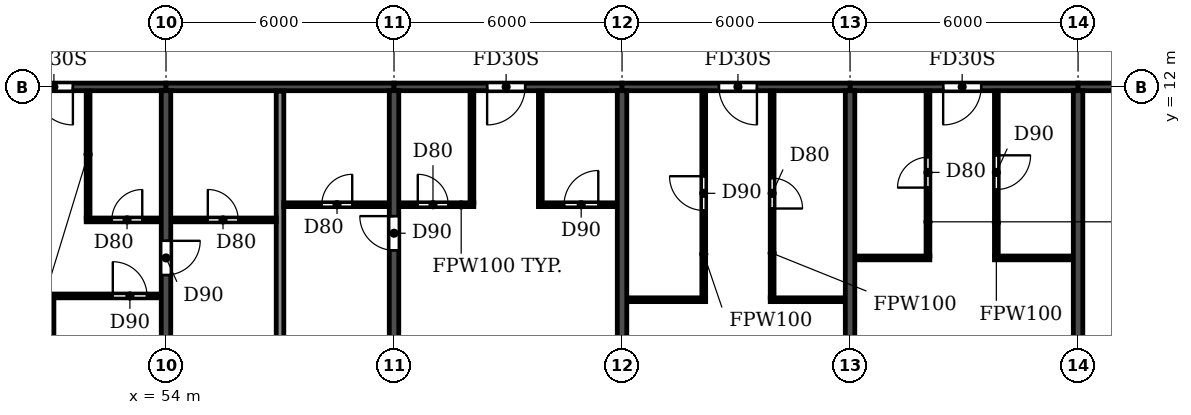
"""IFC4 building model, lengths in metres.
Left out: names, types, materials, properties, quantities, classifications, styles, units other than length and angle.
Written with IfcOpenShell. Run it as: python <this file> out.ifc"""

import sys

from ifc_helpers import new_model, si_unit, direction, frame, frame_2d, origin, place, context, subcontext, project, spatial, rectangle, extrude, element, fill, save


model = new_model("IFC4")
c1 = context("Model", 3, precision=1e-05, world=origin(), true_north=direction((0.0, 1.0)))
c2 = subcontext(c1, "Body", "Model", "MODEL_VIEW")
j1 = project(units=[si_unit("LENGTHUNIT", "METRE"), si_unit("PLANEANGLEUNIT", "RADIAN")], contexts=[c1])
p1 = place(None, origin())
s1 = spatial("IfcSite", under=j1, at=p1, CompositionType="ELEMENT")
p2 = place(p1, origin())
s2 = spatial("IfcBuilding", under=s1, at=p2, CompositionType="ELEMENT")
p3 = place(p2, frame((0.0, 0.0, 175.2)))
s3 = spatial("IfcBuildingStorey", under=s2, at=p3, CompositionType="ELEMENT", Elevation=175.2)
p4 = place(p3, frame((54.0, 0.2, 0.0), z_axis=(0.0, 0.0, 1.0), x_axis=(0.0, 1.0, 0.0)))
e1 = element("IfcWall", 1, at=p4, inside=s3, PredefinedType="SHEAR", context=c2, shape_type="SweptSolid", body=[
    extrude(rectangle(XDim=11.7, YDim=0.25, at=frame_2d((5.85, 0.0))), origin(), (0.0, 0.0, 1.0), 3.08),
])
p5 = place(p4, frame((6.85, 0.0, 0.0)))
e2 = element("IfcOpeningElement", 2, at=p5, cuts=e1, PredefinedType="OPENING", context=c2, shape_type="SweptSolid", body=[
    extrude(rectangle(XDim=0.9, YDim=2.1, at=frame_2d((0.45, 1.05))), frame((0.0, 0.135, 0.0), z_axis=(0.0, -1.0, 0.0), x_axis=(1.0, 0.0, 0.0)), (0.0, 0.0, 1.0), 0.27),
])
p6 = place(p3, frame((60.0, 0.2, 0.0), z_axis=(0.0, 0.0, 1.0), x_axis=(0.0, 1.0, 0.0)))
e3 = element("IfcWall", 3, at=p6, inside=s3, PredefinedType="SHEAR", context=c2, shape_type="SweptSolid", body=[
    extrude(rectangle(XDim=11.7, YDim=0.25, at=frame_2d((5.85, 0.0))), origin(), (0.0, 0.0, 1.0), 3.08),
])
p7 = place(p6, frame((7.5, 0.0, 0.0)))
e4 = element("IfcOpeningElement", 4, at=p7, cuts=e3, PredefinedType="OPENING", context=c2, shape_type="SweptSolid", body=[
    extrude(rectangle(XDim=0.9, YDim=2.1, at=frame_2d((0.45, 1.05))), frame((0.0, 0.135, 0.0), z_axis=(0.0, -1.0, 0.0), x_axis=(1.0, 0.0, 0.0)), (0.0, 0.0, 1.0), 0.27),
])
for number, where, z_axis, x_axis in (
    (5, (66.0, 0.2, 0.0), (0.0, 0.0, 1.0), (0.0, 1.0, 0.0)),
    (6, (72.0, 0.2, 0.0), (0.0, 0.0, 1.0), (0.0, 1.0, 0.0)),
    (7, (78.0, 0.2, 0.0), (0.0, 0.0, 1.0), (0.0, 1.0, 0.0)),
):
    element("IfcWall", number, at=place(p3, frame(where, z_axis=z_axis, x_axis=x_axis)), inside=s3, PredefinedType="SHEAR", context=c2, shape_type="SweptSolid", body=[
        extrude(rectangle(XDim=11.7, YDim=0.25, at=frame_2d((5.85, 0.0))), origin(), (0.0, 0.0, 1.0), 3.08),
    ])
p8 = place(p3, frame((48.0, 12.0, 0.0), z_axis=(0.0, 0.0, 1.0), x_axis=(1.0, 0.0, 0.0)))
e8 = element("IfcWall", 8, at=p8, inside=s3, PredefinedType="SHEAR", context=c2, shape_type="SweptSolid", body=[
    extrude(rectangle(XDim=6.0, YDim=0.2, at=frame_2d((3.0, 0.0))), origin(), (0.0, 0.0, 1.0), 2.48),
])
p9 = place(p8, frame((2.55, 0.0, 0.0)))
e9 = element("IfcOpeningElement", 9, at=p9, cuts=e8, PredefinedType="OPENING", context=c2, shape_type="SweptSolid", body=[
    extrude(rectangle(XDim=1.0, YDim=2.1, at=frame_2d((0.5, 1.05))), frame((0.0, 0.11, 0.0), z_axis=(0.0, -1.0, 0.0), x_axis=(1.0, 0.0, 0.0)), (0.0, 0.0, 1.0), 0.22),
])
p10 = place(p3, frame((54.0, 12.0, 0.0), z_axis=(0.0, 0.0, 1.0), x_axis=(1.0, 0.0, 0.0)))
e10 = element("IfcWall", 10, at=p10, inside=s3, PredefinedType="SHEAR", context=c2, shape_type="SweptSolid", body=[
    extrude(rectangle(XDim=6.0, YDim=0.2, at=frame_2d((3.0, 0.0))), origin(), (0.0, 0.0, 1.0), 2.48),
])
p11 = place(p3, frame((60.0, 12.0, 0.0), z_axis=(0.0, 0.0, 1.0), x_axis=(1.0, 0.0, 0.0)))
e11 = element("IfcWall", 11, at=p11, inside=s3, PredefinedType="SHEAR", context=c2, shape_type="SweptSolid", body=[
    extrude(rectangle(XDim=6.0, YDim=0.2, at=frame_2d((3.0, 0.0))), origin(), (0.0, 0.0, 1.0), 2.48),
])
p12 = place(p11, frame((2.45, 0.0, 0.0)))
e12 = element("IfcOpeningElement", 12, at=p12, cuts=e11, PredefinedType="OPENING", context=c2, shape_type="SweptSolid", body=[
    extrude(rectangle(XDim=1.0, YDim=2.1, at=frame_2d((0.5, 1.05))), frame((0.0, 0.11, 0.0), z_axis=(0.0, -1.0, 0.0), x_axis=(1.0, 0.0, 0.0)), (0.0, 0.0, 1.0), 0.22),
])
p13 = place(p3, frame((66.0, 12.0, 0.0), z_axis=(0.0, 0.0, 1.0), x_axis=(1.0, 0.0, 0.0)))
e13 = element("IfcWall", 13, at=p13, inside=s3, PredefinedType="SHEAR", context=c2, shape_type="SweptSolid", body=[
    extrude(rectangle(XDim=6.0, YDim=0.2, at=frame_2d((3.0, 0.0))), origin(), (0.0, 0.0, 1.0), 2.48),
])
p14 = place(p13, frame((2.55, 0.0, 0.0)))
e14 = element("IfcOpeningElement", 14, at=p14, cuts=e13, PredefinedType="OPENING", context=c2, shape_type="SweptSolid", body=[
    extrude(rectangle(XDim=1.0, YDim=2.1, at=frame_2d((0.5, 1.05))), frame((0.0, 0.11, 0.0), z_axis=(0.0, -1.0, 0.0), x_axis=(1.0, 0.0, 0.0)), (0.0, 0.0, 1.0), 0.22),
])
p15 = place(p3, frame((72.0, 12.0, 0.0), z_axis=(0.0, 0.0, 1.0), x_axis=(1.0, 0.0, 0.0)))
e15 = element("IfcWall", 15, at=p15, inside=s3, PredefinedType="SHEAR", context=c2, shape_type="SweptSolid", body=[
    extrude(rectangle(XDim=6.0, YDim=0.2, at=frame_2d((3.0, 0.0))), origin(), (0.0, 0.0, 1.0), 2.48),
])
p16 = place(p15, frame((2.45, 0.0, 0.0)))
e16 = element("IfcOpeningElement", 16, at=p16, cuts=e15, PredefinedType="OPENING", context=c2, shape_type="SweptSolid", body=[
    extrude(rectangle(XDim=1.0, YDim=2.1, at=frame_2d((0.5, 1.05))), frame((0.0, 0.11, 0.0), z_axis=(0.0, -1.0, 0.0), x_axis=(1.0, 0.0, 0.0)), (0.0, 0.0, 1.0), 0.22),
])
p17 = place(p3, frame((78.0, 12.0, 0.0), z_axis=(0.0, 0.0, 1.0), x_axis=(1.0, 0.0, 0.0)))
e17 = element("IfcWall", 17, at=p17, inside=s3, PredefinedType="SHEAR", context=c2, shape_type="SweptSolid", body=[
    extrude(rectangle(XDim=5.8, YDim=0.2, at=frame_2d((2.9, 0.0))), origin(), (0.0, 0.0, 1.0), 2.48),
])
p18 = place(p17, frame((2.5, 0.0, 0.0)))
e18 = element("IfcOpeningElement", 18, at=p18, cuts=e17, PredefinedType="OPENING", context=c2, shape_type="SweptSolid", body=[
    extrude(rectangle(XDim=1.0, YDim=2.1, at=frame_2d((0.5, 1.05))), frame((0.0, 0.11, 0.0), z_axis=(0.0, -1.0, 0.0), x_axis=(1.0, 0.0, 0.0)), (0.0, 0.0, 1.0), 0.22),
])
p19 = place(p3, frame((57.0, 0.06, 0.0), z_axis=(0.0, 0.0, 1.0), x_axis=(0.0, 1.0, 0.0)))
e19 = element("IfcWall", 19, at=p19, inside=s3, PredefinedType="PARTITIONING", context=c2, shape_type="SweptSolid", body=[
    extrude(rectangle(XDim=11.83, YDim=0.2, at=frame_2d((5.915, 0.0))), origin(), (0.0, 0.0, 1.0), 3.08),
])
p20 = place(p3, frame((66.135, 6.4, 0.0), z_axis=(0.0, 0.0, 1.0), x_axis=(1.0, 0.0, 0.0)))
e20 = element("IfcWall", 20, at=p20, inside=s3, PredefinedType="PARTITIONING", context=c2, shape_type="SweptSolid", body=[
    extrude(rectangle(XDim=2.065, YDim=0.1, at=frame_2d((1.032, 0.0))), origin(), (0.0, 0.0, 1.0), 3.08),
])
p21 = place(p3, frame((69.9, 6.4, 0.0), z_axis=(0.0, 0.0, 1.0), x_axis=(1.0, 0.0, 0.0)))
e21 = element("IfcWall", 21, at=p21, inside=s3, PredefinedType="PARTITIONING", context=c2, shape_type="SweptSolid", body=[
    extrude(rectangle(XDim=1.965, YDim=0.1, at=frame_2d((0.982, 0.0))), origin(), (0.0, 0.0, 1.0), 3.08),
])
p22 = place(p3, frame((50.95, 6.5, 0.0), z_axis=(0.0, 0.0, 1.0), x_axis=(1.0, 0.0, 0.0)))
e22 = element("IfcWall", 22, at=p22, inside=s3, PredefinedType="PARTITIONING", context=c2, shape_type="SweptSolid", body=[
    extrude(rectangle(XDim=2.915, YDim=0.1, at=frame_2d((1.458, 0.0))), origin(), (0.0, 0.0, 1.0), 3.08),
])
p23 = place(p22, frame((1.65, 0.0, 0.0)))
e23 = element("IfcOpeningElement", 23, at=p23, cuts=e22, PredefinedType="OPENING", context=c2, shape_type="SweptSolid", body=[
    extrude(rectangle(XDim=0.9, YDim=2.1, at=frame_2d((0.45, 1.05))), frame((0.0, 0.06, 0.0), z_axis=(0.0, -1.0, 0.0), x_axis=(1.0, 0.0, 0.0)), (0.0, 0.0, 1.0), 0.12),
])
p24 = place(p3, frame((72.135, 7.5, 0.0), z_axis=(0.0, 0.0, 1.0), x_axis=(1.0, 0.0, 0.0)))
e24 = element("IfcWall", 24, at=p24, inside=s3, PredefinedType="PARTITIONING", context=c2, shape_type="SweptSolid", body=[
    extrude(rectangle(XDim=1.965, YDim=0.1, at=frame_2d((0.982, 0.0))), origin(), (0.0, 0.0, 1.0), 3.08),
])
p25 = place(p3, frame((75.8, 7.5, 0.0), z_axis=(0.0, 0.0, 1.0), x_axis=(1.0, 0.0, 0.0)))
e25 = element("IfcWall", 25, at=p25, inside=s3, PredefinedType="PARTITIONING", context=c2, shape_type="SweptSolid", body=[
    extrude(rectangle(XDim=2.065, YDim=0.1, at=frame_2d((1.032, 0.0))), origin(), (0.0, 0.0, 1.0), 3.08),
])
p26 = place(p3, frame((51.9, 8.5, 0.0), z_axis=(0.0, 0.0, 1.0), x_axis=(1.0, 0.0, 0.0)))
e26 = element("IfcWall", 26, at=p26, inside=s3, PredefinedType="PARTITIONING", context=c2, shape_type="SweptSolid", body=[
    extrude(rectangle(XDim=1.965, YDim=0.1, at=frame_2d((0.982, 0.0))), origin(), (0.0, 0.0, 1.0), 3.08),
])
p27 = place(p26, frame((0.675, 0.0, 0.0)))
e27 = element("IfcOpeningElement", 27, at=p27, cuts=e26, PredefinedType="OPENING", context=c2, shape_type="SweptSolid", body=[
    extrude(rectangle(XDim=0.8, YDim=2.1, at=frame_2d((0.4, 1.05))), frame((0.0, 0.06, 0.0), z_axis=(0.0, -1.0, 0.0), x_axis=(1.0, 0.0, 0.0)), (0.0, 0.0, 1.0), 0.12),
])
p28 = place(p3, frame((54.135, 8.5, 0.0), z_axis=(0.0, 0.0, 1.0), x_axis=(1.0, 0.0, 0.0)))
e28 = element("IfcWall", 28, at=p28, inside=s3, PredefinedType="PARTITIONING", context=c2, shape_type="SweptSolid", body=[
    extrude(rectangle(XDim=2.765, YDim=0.1, at=frame_2d((1.382, 0.0))), origin(), (0.0, 0.0, 1.0), 3.08),
])
p29 = place(p28, frame((0.965, 0.0, 0.0)))
e29 = element("IfcOpeningElement", 29, at=p29, cuts=e28, PredefinedType="OPENING", context=c2, shape_type="SweptSolid", body=[
    extrude(rectangle(XDim=0.8, YDim=2.1, at=frame_2d((0.4, 1.05))), frame((0.0, 0.06, 0.0), z_axis=(0.0, -1.0, 0.0), x_axis=(1.0, 0.0, 0.0)), (0.0, 0.0, 1.0), 0.12),
])
p30 = place(p3, frame((57.1, 8.9, 0.0), z_axis=(0.0, 0.0, 1.0), x_axis=(1.0, 0.0, 0.0)))
e30 = element("IfcWall", 30, at=p30, inside=s3, PredefinedType="PARTITIONING", context=c2, shape_type="SweptSolid", body=[
    extrude(rectangle(XDim=2.765, YDim=0.1, at=frame_2d((1.382, 0.0))), origin(), (0.0, 0.0, 1.0), 3.08),
])
p31 = place(p30, frame((1.0, 0.0, 0.0)))
e31 = element("IfcOpeningElement", 31, at=p31, cuts=e30, PredefinedType="OPENING", context=c2, shape_type="SweptSolid", body=[
    extrude(rectangle(XDim=0.8, YDim=2.1, at=frame_2d((0.4, 1.05))), frame((0.0, 0.06, 0.0), z_axis=(0.0, -1.0, 0.0), x_axis=(1.0, 0.0, 0.0)), (0.0, 0.0, 1.0), 0.12),
])
p32 = place(p3, frame((60.135, 8.9, 0.0), z_axis=(0.0, 0.0, 1.0), x_axis=(1.0, 0.0, 0.0)))
e32 = element("IfcWall", 32, at=p32, inside=s3, PredefinedType="PARTITIONING", context=c2, shape_type="SweptSolid", body=[
    extrude(rectangle(XDim=1.965, YDim=0.1, at=frame_2d((0.982, 0.0))), origin(), (0.0, 0.0, 1.0), 3.08),
])
p33 = place(p32, frame((0.49, 0.0, 0.0)))
e33 = element("IfcOpeningElement", 33, at=p33, cuts=e32, PredefinedType="OPENING", context=c2, shape_type="SweptSolid", body=[
    extrude(rectangle(XDim=0.8, YDim=2.1, at=frame_2d((0.4, 1.05))), frame((0.0, 0.06, 0.0), z_axis=(0.0, -1.0, 0.0), x_axis=(1.0, 0.0, 0.0)), (0.0, 0.0, 1.0), 0.12),
])
p34 = place(p3, frame((63.8, 8.9, 0.0), z_axis=(0.0, 0.0, 1.0), x_axis=(1.0, 0.0, 0.0)))
e34 = element("IfcWall", 34, at=p34, inside=s3, PredefinedType="PARTITIONING", context=c2, shape_type="SweptSolid", body=[
    extrude(rectangle(XDim=2.065, YDim=0.1, at=frame_2d((1.032, 0.0))), origin(), (0.0, 0.0, 1.0), 3.08),
])
p35 = place(p34, frame((0.675, 0.0, 0.0)))
e35 = element("IfcOpeningElement", 35, at=p35, cuts=e34, PredefinedType="OPENING", context=c2, shape_type="SweptSolid", body=[
    extrude(rectangle(XDim=0.9, YDim=2.1, at=frame_2d((0.45, 1.05))), frame((0.0, 0.06, 0.0), z_axis=(0.0, -1.0, 0.0), x_axis=(1.0, 0.0, 0.0)), (0.0, 0.0, 1.0), 0.12),
])
p36 = place(p3, frame((51.0, 0.06, 0.0), z_axis=(0.0, 0.0, 1.0), x_axis=(0.0, 1.0, 0.0)))
e36 = element("IfcWall", 36, at=p36, inside=s3, PredefinedType="PARTITIONING", context=c2, shape_type="SweptSolid", body=[
    extrude(rectangle(XDim=6.39, YDim=0.1, at=frame_2d((3.195, 0.0))), origin(), (0.0, 0.0, 1.0), 3.08),
])
p37 = place(p3, frame((51.95, 8.55, 0.0), z_axis=(0.0, 0.0, 1.0), x_axis=(0.0, 1.0, 0.0)))
e37 = element("IfcWall", 37, at=p37, inside=s3, PredefinedType="PARTITIONING", context=c2, shape_type="SweptSolid", body=[
    extrude(rectangle(XDim=3.34, YDim=0.1, at=frame_2d((1.67, 0.0))), origin(), (0.0, 0.0, 1.0), 3.08),
])
for number, where, z_axis, x_axis in (
    (38, (62.05, 8.95, 0.0), (0.0, 0.0, 1.0), (0.0, 1.0, 0.0)),
    (39, (63.85, 8.95, 0.0), (0.0, 0.0, 1.0), (0.0, 1.0, 0.0)),
):
    element("IfcWall", number, at=place(p3, frame(where, z_axis=z_axis, x_axis=x_axis)), inside=s3, PredefinedType="PARTITIONING", context=c2, shape_type="SweptSolid", body=[
        extrude(rectangle(XDim=2.94, YDim=0.1, at=frame_2d((1.47, 0.0))), origin(), (0.0, 0.0, 1.0), 3.08),
    ])
p38 = place(p3, frame((68.15, 6.45, 0.0), z_axis=(0.0, 0.0, 1.0), x_axis=(0.0, 1.0, 0.0)))
e40 = element("IfcWall", 40, at=p38, inside=s3, PredefinedType="PARTITIONING", context=c2, shape_type="SweptSolid", body=[
    extrude(rectangle(XDim=5.44, YDim=0.1, at=frame_2d((2.72, 0.0))), origin(), (0.0, 0.0, 1.0), 3.08),
])
p39 = place(p38, frame((2.3, 0.0, 0.0)))
e41 = element("IfcOpeningElement", 41, at=p39, cuts=e40, PredefinedType="OPENING", context=c2, shape_type="SweptSolid", body=[
    extrude(rectangle(XDim=0.9, YDim=2.1, at=frame_2d((0.45, 1.05))), frame((0.0, 0.06, 0.0), z_axis=(0.0, -1.0, 0.0), x_axis=(1.0, 0.0, 0.0)), (0.0, 0.0, 1.0), 0.12),
])
p40 = place(p3, frame((69.95, 6.45, 0.0), z_axis=(0.0, 0.0, 1.0), x_axis=(0.0, 1.0, 0.0)))
e42 = element("IfcWall", 42, at=p40, inside=s3, PredefinedType="PARTITIONING", context=c2, shape_type="SweptSolid", body=[
    extrude(rectangle(XDim=5.44, YDim=0.1, at=frame_2d((2.72, 0.0))), origin(), (0.0, 0.0, 1.0), 3.08),
])
p41 = place(p40, frame((2.35, 0.0, 0.0)))
e43 = element("IfcOpeningElement", 43, at=p41, cuts=e42, PredefinedType="OPENING", context=c2, shape_type="SweptSolid", body=[
    extrude(rectangle(XDim=0.8, YDim=2.1, at=frame_2d((0.4, 1.05))), frame((0.0, 0.06, 0.0), z_axis=(0.0, -1.0, 0.0), x_axis=(1.0, 0.0, 0.0)), (0.0, 0.0, 1.0), 0.12),
])
p42 = place(p3, frame((74.05, 7.55, 0.0), z_axis=(0.0, 0.0, 1.0), x_axis=(0.0, 1.0, 0.0)))
e44 = element("IfcWall", 44, at=p42, inside=s3, PredefinedType="PARTITIONING", context=c2, shape_type="SweptSolid", body=[
    extrude(rectangle(XDim=4.34, YDim=0.1, at=frame_2d((2.17, 0.0))), origin(), (0.0, 0.0, 1.0), 3.08),
])
p43 = place(p42, frame((1.8, 0.0, 0.0)))
e45 = element("IfcOpeningElement", 45, at=p43, cuts=e44, PredefinedType="OPENING", context=c2, shape_type="SweptSolid", body=[
    extrude(rectangle(XDim=0.8, YDim=2.1, at=frame_2d((0.4, 1.05))), frame((0.0, 0.06, 0.0), z_axis=(0.0, -1.0, 0.0), x_axis=(1.0, 0.0, 0.0)), (0.0, 0.0, 1.0), 0.12),
])
p44 = place(p3, frame((75.85, 7.55, 0.0), z_axis=(0.0, 0.0, 1.0), x_axis=(0.0, 1.0, 0.0)))
e46 = element("IfcWall", 46, at=p44, inside=s3, PredefinedType="PARTITIONING", context=c2, shape_type="SweptSolid", body=[
    extrude(rectangle(XDim=4.34, YDim=0.1, at=frame_2d((2.17, 0.0))), origin(), (0.0, 0.0, 1.0), 3.08),
])
p45 = place(p44, frame((1.75, 0.0, 0.0)))
e47 = element("IfcOpeningElement", 47, at=p45, cuts=e46, PredefinedType="OPENING", context=c2, shape_type="SweptSolid", body=[
    extrude(rectangle(XDim=0.9, YDim=2.1, at=frame_2d((0.45, 1.05))), frame((0.0, 0.06, 0.0), z_axis=(0.0, -1.0, 0.0), x_axis=(1.0, 0.0, 0.0)), (0.0, 0.0, 1.0), 0.12),
])
p46 = place(p29, origin())
e48 = element("IfcDoor", 48, at=p46, inside=s3, OperationType="SINGLE_SWING_LEFT", PredefinedType="DOOR", context=c2, shape_type="SweptSolid", body=[
    extrude(rectangle(XDim=0.8, YDim=2.1, at=frame_2d((0.4, 1.05))), frame((0.0, 0.025, 0.0), z_axis=(0.0, -1.0, 0.0), x_axis=(1.0, 0.0, 0.0)), (0.0, 0.0, 1.0), 0.05),
])
fill(e29, e48)
p47 = place(p9, frame((1.0, 0.0, 0.0), z_axis=(0.0, 0.0, 1.0), x_axis=(-1.0, 0.0, 0.0)))
e49 = element("IfcDoor", 49, at=p47, inside=s3, OperationType="SINGLE_SWING_LEFT", PredefinedType="DOOR", context=c2, shape_type="SweptSolid", body=[
    extrude(rectangle(XDim=1.0, YDim=2.1, at=frame_2d((0.5, 1.05))), frame((0.0, 0.025, 0.0), z_axis=(0.0, -1.0, 0.0), x_axis=(1.0, 0.0, 0.0)), (0.0, 0.0, 1.0), 0.05),
])
fill(e9, e49)
p48 = place(p27, origin())
e50 = element("IfcDoor", 50, at=p48, inside=s3, OperationType="SINGLE_SWING_RIGHT", PredefinedType="DOOR", context=c2, shape_type="SweptSolid", body=[
    extrude(rectangle(XDim=0.8, YDim=2.1, at=frame_2d((0.4, 1.05))), frame((0.0, 0.025, 0.0), z_axis=(0.0, -1.0, 0.0), x_axis=(1.0, 0.0, 0.0)), (0.0, 0.0, 1.0), 0.05),
])
fill(e27, e50)
p49 = place(p23, origin())
e51 = element("IfcDoor", 51, at=p49, inside=s3, OperationType="SINGLE_SWING_LEFT", PredefinedType="DOOR", context=c2, shape_type="SweptSolid", body=[
    extrude(rectangle(XDim=0.9, YDim=2.1, at=frame_2d((0.45, 1.05))), frame((0.0, 0.025, 0.0), z_axis=(0.0, -1.0, 0.0), x_axis=(1.0, 0.0, 0.0)), (0.0, 0.0, 1.0), 0.05),
])
fill(e23, e51)
p50 = place(p5, frame((0.9, 0.0, 0.0), z_axis=(0.0, 0.0, 1.0), x_axis=(-1.0, 0.0, 0.0)))
e52 = element("IfcDoor", 52, at=p50, inside=s3, OperationType="SINGLE_SWING_LEFT", PredefinedType="DOOR", context=c2, shape_type="SweptSolid", body=[
    extrude(rectangle(XDim=0.9, YDim=2.1, at=frame_2d((0.45, 1.05))), frame((0.0, 0.025, 0.0), z_axis=(0.0, -1.0, 0.0), x_axis=(1.0, 0.0, 0.0)), (0.0, 0.0, 1.0), 0.05),
])
fill(e2, e52)
p51 = place(p31, origin())
e53 = element("IfcDoor", 53, at=p51, inside=s3, OperationType="SINGLE_SWING_RIGHT", PredefinedType="DOOR", context=c2, shape_type="SweptSolid", body=[
    extrude(rectangle(XDim=0.8, YDim=2.1, at=frame_2d((0.4, 1.05))), frame((0.0, 0.025, 0.0), z_axis=(0.0, -1.0, 0.0), x_axis=(1.0, 0.0, 0.0)), (0.0, 0.0, 1.0), 0.05),
])
fill(e31, e53)
p52 = place(p7, origin())
e54 = element("IfcDoor", 54, at=p52, inside=s3, OperationType="SINGLE_SWING_RIGHT", PredefinedType="DOOR", context=c2, shape_type="SweptSolid", body=[
    extrude(rectangle(XDim=0.9, YDim=2.1, at=frame_2d((0.45, 1.05))), frame((0.0, 0.025, 0.0), z_axis=(0.0, -1.0, 0.0), x_axis=(1.0, 0.0, 0.0)), (0.0, 0.0, 1.0), 0.05),
])
fill(e4, e54)
p53 = place(p33, origin())
e55 = element("IfcDoor", 55, at=p53, inside=s3, OperationType="SINGLE_SWING_LEFT", PredefinedType="DOOR", context=c2, shape_type="SweptSolid", body=[
    extrude(rectangle(XDim=0.8, YDim=2.1, at=frame_2d((0.4, 1.05))), frame((0.0, 0.025, 0.0), z_axis=(0.0, -1.0, 0.0), x_axis=(1.0, 0.0, 0.0)), (0.0, 0.0, 1.0), 0.05),
])
fill(e33, e55)
p54 = place(p12, frame((1.0, 0.0, 0.0), z_axis=(0.0, 0.0, 1.0), x_axis=(-1.0, 0.0, 0.0)))
e56 = element("IfcDoor", 56, at=p54, inside=s3, OperationType="SINGLE_SWING_RIGHT", PredefinedType="DOOR", context=c2, shape_type="SweptSolid", body=[
    extrude(rectangle(XDim=1.0, YDim=2.1, at=frame_2d((0.5, 1.05))), frame((0.0, 0.025, 0.0), z_axis=(0.0, -1.0, 0.0), x_axis=(1.0, 0.0, 0.0)), (0.0, 0.0, 1.0), 0.05),
])
fill(e12, e56)
p55 = place(p35, origin())
e57 = element("IfcDoor", 57, at=p55, inside=s3, OperationType="SINGLE_SWING_RIGHT", PredefinedType="DOOR", context=c2, shape_type="SweptSolid", body=[
    extrude(rectangle(XDim=0.9, YDim=2.1, at=frame_2d((0.45, 1.05))), frame((0.0, 0.025, 0.0), z_axis=(0.0, -1.0, 0.0), x_axis=(1.0, 0.0, 0.0)), (0.0, 0.0, 1.0), 0.05),
])
fill(e35, e57)
p56 = place(p39, origin())
e58 = element("IfcDoor", 58, at=p56, inside=s3, OperationType="SINGLE_SWING_RIGHT", PredefinedType="DOOR", context=c2, shape_type="SweptSolid", body=[
    extrude(rectangle(XDim=0.9, YDim=2.1, at=frame_2d((0.45, 1.05))), frame((0.0, 0.025, 0.0), z_axis=(0.0, -1.0, 0.0), x_axis=(1.0, 0.0, 0.0)), (0.0, 0.0, 1.0), 0.05),
])
fill(e41, e58)
p57 = place(p14, frame((1.0, 0.0, 0.0), z_axis=(0.0, 0.0, 1.0), x_axis=(-1.0, 0.0, 0.0)))
e59 = element("IfcDoor", 59, at=p57, inside=s3, OperationType="SINGLE_SWING_LEFT", PredefinedType="DOOR", context=c2, shape_type="SweptSolid", body=[
    extrude(rectangle(XDim=1.0, YDim=2.1, at=frame_2d((0.5, 1.05))), frame((0.0, 0.025, 0.0), z_axis=(0.0, -1.0, 0.0), x_axis=(1.0, 0.0, 0.0)), (0.0, 0.0, 1.0), 0.05),
])
fill(e14, e59)
p58 = place(p41, frame((0.8, 0.0, 0.0), z_axis=(0.0, 0.0, 1.0), x_axis=(-1.0, 0.0, 0.0)))
e60 = element("IfcDoor", 60, at=p58, inside=s3, OperationType="SINGLE_SWING_RIGHT", PredefinedType="DOOR", context=c2, shape_type="SweptSolid", body=[
    extrude(rectangle(XDim=0.8, YDim=2.1, at=frame_2d((0.4, 1.05))), frame((0.0, 0.025, 0.0), z_axis=(0.0, -1.0, 0.0), x_axis=(1.0, 0.0, 0.0)), (0.0, 0.0, 1.0), 0.05),
])
fill(e43, e60)
p59 = place(p43, origin())
e61 = element("IfcDoor", 61, at=p59, inside=s3, OperationType="SINGLE_SWING_LEFT", PredefinedType="DOOR", context=c2, shape_type="SweptSolid", body=[
    extrude(rectangle(XDim=0.8, YDim=2.1, at=frame_2d((0.4, 1.05))), frame((0.0, 0.025, 0.0), z_axis=(0.0, -1.0, 0.0), x_axis=(1.0, 0.0, 0.0)), (0.0, 0.0, 1.0), 0.05),
])
fill(e45, e61)
p60 = place(p16, frame((1.0, 0.0, 0.0), z_axis=(0.0, 0.0, 1.0), x_axis=(-1.0, 0.0, 0.0)))
e62 = element("IfcDoor", 62, at=p60, inside=s3, OperationType="SINGLE_SWING_RIGHT", PredefinedType="DOOR", context=c2, shape_type="SweptSolid", body=[
    extrude(rectangle(XDim=1.0, YDim=2.1, at=frame_2d((0.5, 1.05))), frame((0.0, 0.025, 0.0), z_axis=(0.0, -1.0, 0.0), x_axis=(1.0, 0.0, 0.0)), (0.0, 0.0, 1.0), 0.05),
])
fill(e16, e62)
p61 = place(p45, frame((0.9, 0.0, 0.0), z_axis=(0.0, 0.0, 1.0), x_axis=(-1.0, 0.0, 0.0)))
e63 = element("IfcDoor", 63, at=p61, inside=s3, OperationType="SINGLE_SWING_LEFT", PredefinedType="DOOR", context=c2, shape_type="SweptSolid", body=[
    extrude(rectangle(XDim=0.9, YDim=2.1, at=frame_2d((0.45, 1.05))), frame((0.0, 0.025, 0.0), z_axis=(0.0, -1.0, 0.0), x_axis=(1.0, 0.0, 0.0)), (0.0, 0.0, 1.0), 0.05),
])
fill(e47, e63)
save(model, sys.argv[1])
